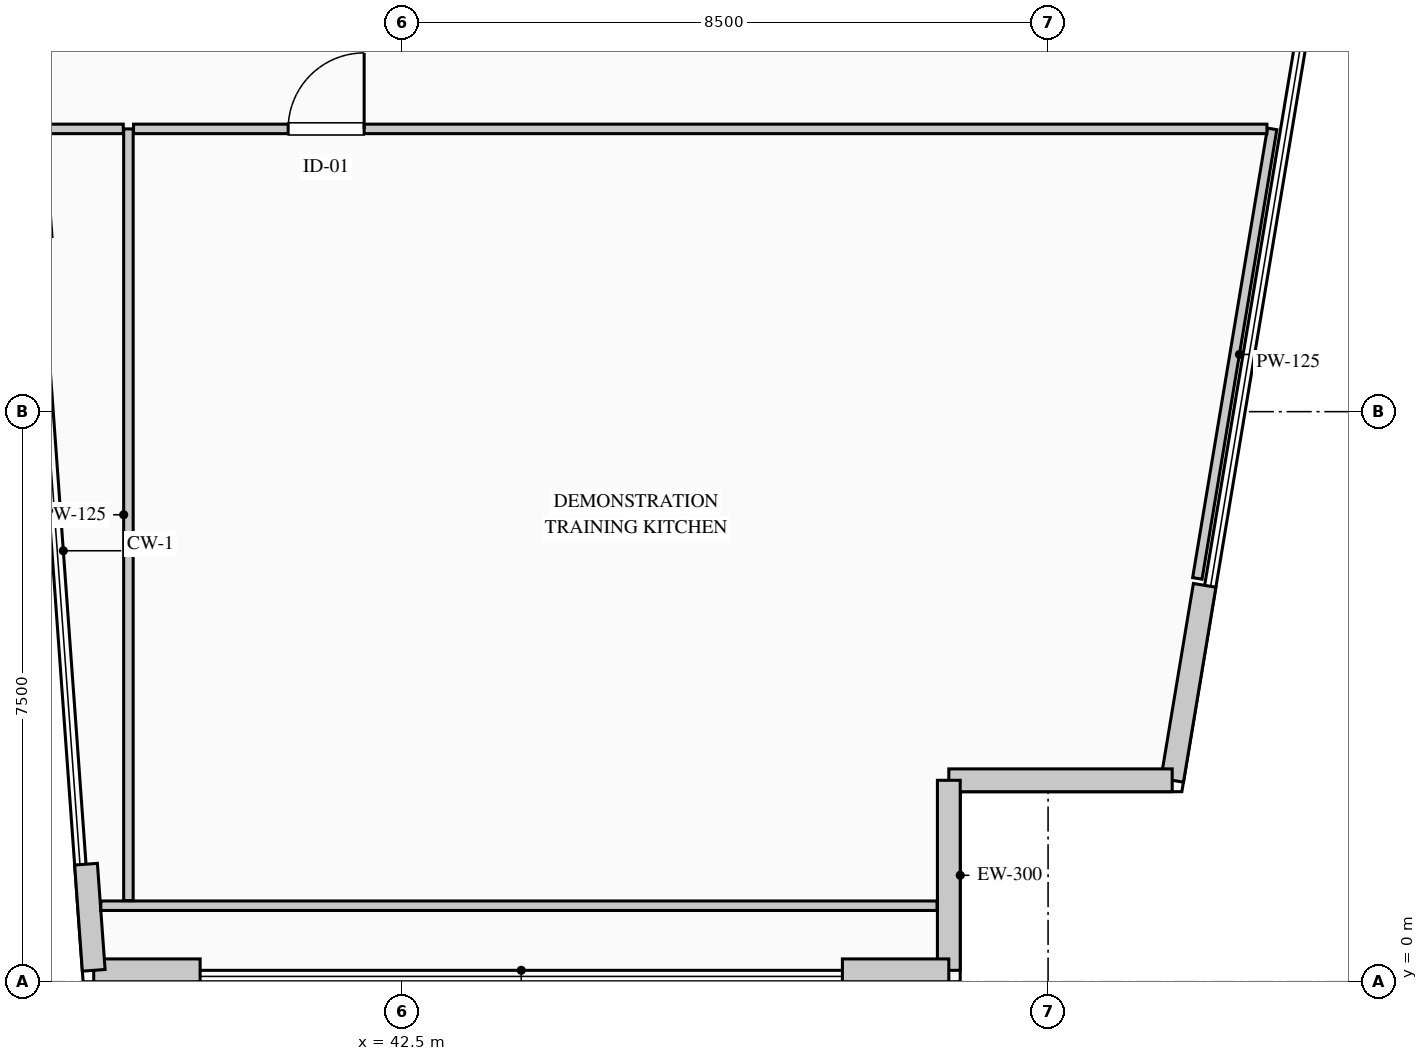
"""IFC4 building model, lengths in metres.
Left out: names, types, materials, properties, quantities, classifications, styles, units other than length and angle.
Written with IfcOpenShell. Run it as: python <this file> out.ifc"""

import sys

from ifc_helpers import new_model, si_unit, direction, frame, frame_2d, origin, place, context, subcontext, project, spatial, rectangle, extrude, element, fill, save


model = new_model("IFC4")
c1 = context("Model", 3, precision=1e-05, world=origin(), true_north=direction((0.0, 1.0)))
c2 = subcontext(c1, "Body", "Model", "MODEL_VIEW")
j1 = project(units=[si_unit("LENGTHUNIT", "METRE"), si_unit("PLANEANGLEUNIT", "RADIAN")], contexts=[c1])
p1 = place(None, origin())
s1 = spatial("IfcSite", under=j1, at=p1, CompositionType="ELEMENT")
p2 = place(p1, origin())
s2 = spatial("IfcBuilding", under=s1, at=p2, CompositionType="ELEMENT")
p3 = place(p2, frame((0.0, 0.0, 16.2)))
s3 = spatial("IfcBuildingStorey", under=s2, at=p3, CompositionType="ELEMENT", Elevation=16.2)
p4 = place(p3, frame((53.06, 5.215, 0.0), z_axis=(0.0, 0.0, 1.0), x_axis=(-0.164140117583, -0.986437033875, 0.0)))
e1 = element("IfcWall", 1, at=p4, inside=s3, PredefinedType="STANDARD", context=c2, shape_type="SweptSolid", body=[
    extrude(rectangle(XDim=2.6, YDim=0.3, at=frame_2d((1.3, 0.0))), origin(), (0.0, 0.0, 1.0), 5.0),
])
p5 = place(p3, frame((52.633, 2.65, 0.0), z_axis=(0.0, 0.0, 1.0), x_axis=(-1.0, 0.0, 0.0)))
e2 = element("IfcWall", 2, at=p5, inside=s3, PredefinedType="STANDARD", context=c2, shape_type="SweptSolid", body=[
    extrude(rectangle(XDim=2.939, YDim=0.3, at=frame_2d((1.469, 0.0))), origin(), (0.0, 0.0, 1.0), 5.0),
])
p6 = place(p3, frame((49.694, 2.65, 0.0), z_axis=(0.0, 0.0, 1.0), x_axis=(0.0, -1.0, 0.0)))
e3 = element("IfcWall", 3, at=p6, inside=s3, PredefinedType="STANDARD", context=c2, shape_type="SweptSolid", body=[
    extrude(rectangle(XDim=2.5, YDim=0.3, at=frame_2d((1.25, 0.0))), origin(), (0.0, 0.0, 1.0), 5.0),
])
p7 = place(p3, frame((49.694, 0.15, 0.0), z_axis=(0.0, 0.0, 1.0), x_axis=(-1.0, 0.0, 0.0)))
e4 = element("IfcWall", 4, at=p7, inside=s3, PredefinedType="STANDARD", context=c2, shape_type="SweptSolid", body=[
    extrude(rectangle(XDim=1.4, YDim=0.3, at=frame_2d((0.7, 0.0))), origin(), (0.0, 0.0, 1.0), 5.0),
])
p8 = place(p3, frame((39.844, 0.15, 0.0), z_axis=(0.0, 0.0, 1.0), x_axis=(-1.0, 0.0, 0.0)))
e5 = element("IfcWall", 5, at=p8, inside=s3, PredefinedType="STANDARD", context=c2, shape_type="SweptSolid", body=[
    extrude(rectangle(XDim=1.4, YDim=0.3, at=frame_2d((0.7, 0.0))), origin(), (0.0, 0.0, 1.0), 5.0),
])
p9 = place(p3, frame((38.444, 0.15, 0.0), z_axis=(0.0, 0.0, 1.0), x_axis=(-0.072362245244, 0.997378416381, 0.0)))
e6 = element("IfcWall", 6, at=p9, inside=s3, PredefinedType="STANDARD", context=c2, shape_type="SweptSolid", body=[
    extrude(rectangle(XDim=1.4, YDim=0.3, at=frame_2d((0.7, 0.0))), origin(), (0.0, 0.0, 1.0), 5.0),
])
p10 = place(p3, frame((53.948, 11.22, 0.0), z_axis=(0.0, 0.0, 1.0), x_axis=(-0.164154643918, -0.986434616627, 0.0)))
e7 = element("IfcWall", 7, at=p10, inside=s3, PredefinedType="PARTITIONING", context=c2, shape_type="SweptSolid", body=[
    extrude(rectangle(XDim=5.995, YDim=0.125, at=frame_2d((2.998, 0.0))), origin(), (0.0, 0.0, 1.0), 5.0),
])
p11 = place(p3, frame((49.539, 1.0, 0.0), z_axis=(0.0, 0.0, 1.0), x_axis=(-1.0, 0.0, 0.0)))
e8 = element("IfcWall", 8, at=p11, inside=s3, PredefinedType="PARTITIONING", context=c2, shape_type="SweptSolid", body=[
    extrude(rectangle(XDim=11.002, YDim=0.125, at=frame_2d((5.501, 0.0))), origin(), (0.0, 0.0, 1.0), 5.0),
])
p12 = place(p3, frame((38.9, 1.067, 0.0), z_axis=(0.0, 0.0, 1.0), x_axis=(0.0, 1.0, 0.0)))
e9 = element("IfcWall", 9, at=p12, inside=s3, PredefinedType="PARTITIONING", context=c2, shape_type="SweptSolid", body=[
    extrude(rectangle(XDim=10.153, YDim=0.125, at=frame_2d((5.076, 0.0))), origin(), (0.0, 0.0, 1.0), 5.0),
])
p13 = place(p3, frame((37.718, 11.22, 0.0), z_axis=(0.0, 0.0, 1.0), x_axis=(1.0, 0.0, 0.0)))
e10 = element("IfcWall", 10, at=p13, inside=s3, PredefinedType="PARTITIONING", context=c2, shape_type="SweptSolid", body=[
    extrude(rectangle(XDim=1.115, YDim=0.125, at=frame_2d((0.557, 0.0))), origin(), (0.0, 0.0, 1.0), 5.0),
])
p14 = place(p3, frame((38.968, 11.22, 0.0), z_axis=(0.0, 0.0, 1.0), x_axis=(1.0, 0.0, 0.0)))
e11 = element("IfcWall", 11, at=p14, inside=s3, PredefinedType="PARTITIONING", context=c2, shape_type="SweptSolid", body=[
    extrude(rectangle(XDim=14.912, YDim=0.125, at=frame_2d((7.456, 0.0))), origin(), (0.0, 0.0, 1.0), 5.0),
])
p15 = place(p14, frame((2.034, 0.0, 0.0)))
e12 = element("IfcOpeningElement", 12, at=p15, cuts=e11, PredefinedType="OPENING", context=c2, shape_type="SweptSolid", body=[
    extrude(rectangle(XDim=1.0, YDim=2.15, at=frame_2d((0.5, 1.075))), frame((0.0, 0.073, 0.0), z_axis=(0.0, -1.0, 0.0), x_axis=(1.0, 0.0, 0.0)), (0.0, 0.0, 1.0), 0.145),
])
p16 = place(p15, origin())
e13 = element("IfcDoor", 13, at=p16, inside=s3, OperationType="SINGLE_SWING_RIGHT", PredefinedType="DOOR", context=c2, shape_type="SweptSolid", body=[
    extrude(rectangle(XDim=1.0, YDim=2.15, at=frame_2d((0.5, 1.075))), frame((0.0, 0.025, 0.0), z_axis=(0.0, -1.0, 0.0), x_axis=(1.0, 0.0, 0.0)), (0.0, 0.0, 1.0), 0.05),
])
fill(e12, e13)
save(model, sys.argv[1])
